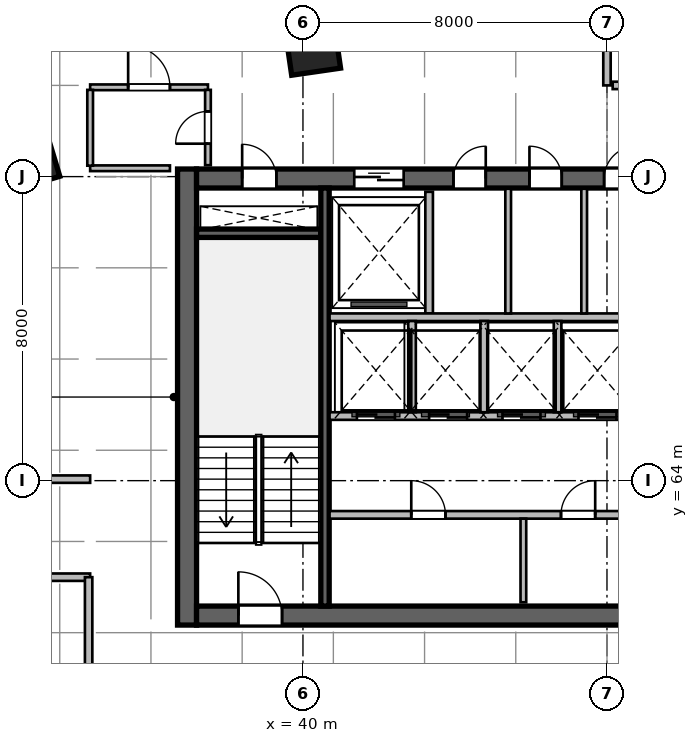
"""IFC4 building model, lengths in metres.
Left out: names, types, materials, properties, quantities, classifications, styles, units other than length and angle.
Written with IfcOpenShell. Run it as: python <this file> out.ifc"""

import sys

from ifc_helpers import new_model, si_unit, direction, frame, frame_2d, origin, origin_2d, place, context, subcontext, project, spatial, rectangle, extrude, source, transform, mapped, element, fill, save


model = new_model("IFC4")
c1 = context("Model", 3, precision=1e-05, world=origin(), true_north=direction((0.0, 1.0)))
c2 = subcontext(c1, "Body", "Model", "MODEL_VIEW")
j1 = project(units=[si_unit("LENGTHUNIT", "METRE"), si_unit("PLANEANGLEUNIT", "RADIAN")], contexts=[c1])
p1 = place(None, origin())
s1 = spatial("IfcSite", under=j1, at=p1, CompositionType="ELEMENT")
p2 = place(p1, origin())
s2 = spatial("IfcBuilding", under=s1, at=p2, CompositionType="ELEMENT")
p3 = place(p2, frame((0.0, 0.0, 111.6)))
s3 = spatial("IfcBuildingStorey", under=s2, at=p3, CompositionType="ELEMENT", Elevation=111.6)
m1 = source(origin(), c2, "Body", "SweptSolid", [
    extrude(rectangle(XDim=12.0, YDim=0.5, at=frame_2d((6.0, 0.0))), origin(), (0.0, 0.0, 1.0), 3.9),
])
p4 = place(p3, frame((36.95, 60.2, 0.0), z_axis=(0.0, 0.0, 1.0), x_axis=(0.0, 1.0, 0.0)))
e1 = element("IfcWall", 1, at=p4, inside=s3, PredefinedType="SHEAR", context=c2, shape_type="MappedRepresentation", body=[
    mapped(m1, transform((0.0, 0.0, 0.0), scale=1.0)),
])
m2 = source(origin(), c2, "Body", "SweptSolid", [
    extrude(rectangle(XDim=21.6, YDim=0.5, at=frame_2d((10.8, 0.0))), origin(), (0.0, 0.0, 1.0), 3.9),
])
p5 = place(p3, frame((37.2, 60.45, 0.0), z_axis=(0.0, 0.0, 1.0), x_axis=(1.0, 0.0, 0.0)))
e2 = element("IfcWall", 2, at=p5, inside=s3, PredefinedType="SHEAR", context=c2, shape_type="MappedRepresentation", body=[
    mapped(m2, transform((0.0, 0.0, 0.0), scale=1.0)),
])
p6 = place(p5, frame((1.1, 0.0, 0.0)))
e3 = element("IfcOpeningElement", 3, at=p6, cuts=e2, PredefinedType="OPENING", context=c2, shape_type="SweptSolid", body=[
    extrude(rectangle(XDim=1.15, YDim=2.15, at=frame_2d((0.575, 1.075))), frame((0.0, 0.26, 0.0), z_axis=(0.0, -1.0, 0.0), x_axis=(1.0, 0.0, 0.0)), (0.0, 0.0, 1.0), 0.52),
])
p7 = place(p5, frame((19.5, 0.0, 0.0)))
e4 = element("IfcOpeningElement", 4, at=p7, cuts=e2, PredefinedType="OPENING", context=c2, shape_type="SweptSolid", body=[
    extrude(rectangle(XDim=0.9, YDim=2.1, at=frame_2d((0.45, 1.05))), frame((0.0, 0.26, 0.0), z_axis=(0.0, -1.0, 0.0), x_axis=(1.0, 0.0, 0.0)), (0.0, 0.0, 1.0), 0.52),
])
p8 = place(p5, frame((12.02, 0.0, 0.0)))
e5 = element("IfcOpeningElement", 5, at=p8, cuts=e2, PredefinedType="OPENING", context=c2, shape_type="SweptSolid", body=[
    extrude(rectangle(XDim=1.6, YDim=2.15, at=frame_2d((0.8, 1.075))), frame((0.0, 0.26, 0.0), z_axis=(0.0, -1.0, 0.0), x_axis=(1.0, 0.0, 0.0)), (0.0, 0.0, 1.0), 0.52),
])
p9 = place(p3, frame((37.2, 71.95, 0.0), z_axis=(0.0, 0.0, 1.0), x_axis=(1.0, 0.0, 0.0)))
e6 = element("IfcWall", 6, at=p9, inside=s3, PredefinedType="SHEAR", context=c2, shape_type="MappedRepresentation", body=[
    mapped(m2, transform((0.0, 0.0, 0.0), scale=1.0)),
])
p10 = place(p9, frame((1.2, 0.0, 0.0)))
e7 = element("IfcOpeningElement", 7, at=p10, cuts=e6, PredefinedType="OPENING", context=c2, shape_type="SweptSolid", body=[
    extrude(rectangle(XDim=0.9, YDim=2.1, at=frame_2d((0.45, 1.05))), frame((0.0, 0.26, 0.0), z_axis=(0.0, -1.0, 0.0), x_axis=(1.0, 0.0, 0.0)), (0.0, 0.0, 1.0), 0.52),
])
p11 = place(p9, frame((14.7, 0.0, 0.0)))
e8 = element("IfcOpeningElement", 8, at=p11, cuts=e6, PredefinedType="OPENING", context=c2, shape_type="SweptSolid", body=[
    extrude(rectangle(XDim=1.2, YDim=2.15, at=frame_2d((0.6, 1.075))), frame((0.0, 0.26, 0.0), z_axis=(0.0, -1.0, 0.0), x_axis=(1.0, 0.0, 0.0)), (0.0, 0.0, 1.0), 0.52),
])
p12 = place(p9, frame((4.15, 0.0, 0.0)))
e9 = element("IfcOpeningElement", 9, at=p12, cuts=e6, PredefinedType="OPENING", context=c2, shape_type="SweptSolid", body=[
    extrude(rectangle(XDim=1.3, YDim=2.15, at=frame_2d((0.65, 1.075))), frame((0.0, 0.26, 0.0), z_axis=(0.0, -1.0, 0.0), x_axis=(1.0, 0.0, 0.0)), (0.0, 0.0, 1.0), 0.52),
])
p13 = place(p9, frame((6.76, 0.0, 0.0)))
e10 = element("IfcOpeningElement", 10, at=p13, cuts=e6, PredefinedType="OPENING", context=c2, shape_type="SweptSolid", body=[
    extrude(rectangle(XDim=0.85, YDim=2.1, at=frame_2d((0.425, 1.05))), frame((0.0, 0.26, 0.0), z_axis=(0.0, -1.0, 0.0), x_axis=(1.0, 0.0, 0.0)), (0.0, 0.0, 1.0), 0.52),
])
p14 = place(p9, frame((8.76, 0.0, 0.0)))
e11 = element("IfcOpeningElement", 11, at=p14, cuts=e6, PredefinedType="OPENING", context=c2, shape_type="SweptSolid", body=[
    extrude(rectangle(XDim=0.85, YDim=2.1, at=frame_2d((0.425, 1.05))), frame((0.0, 0.26, 0.0), z_axis=(0.0, -1.0, 0.0), x_axis=(1.0, 0.0, 0.0)), (0.0, 0.0, 1.0), 0.52),
])
p15 = place(p9, frame((10.725, 0.0, 0.0)))
e12 = element("IfcOpeningElement", 12, at=p15, cuts=e6, PredefinedType="OPENING", context=c2, shape_type="SweptSolid", body=[
    extrude(rectangle(XDim=0.85, YDim=2.1, at=frame_2d((0.425, 1.05))), frame((0.0, 0.26, 0.0), z_axis=(0.0, -1.0, 0.0), x_axis=(1.0, 0.0, 0.0)), (0.0, 0.0, 1.0), 0.52),
])
m3 = source(origin(), c2, "Body", "SweptSolid", [
    extrude(rectangle(XDim=3.27, YDim=0.22, at=frame_2d((1.635, 0.0))), origin(), (0.0, 0.0, 1.0), 3.9),
])
p16 = place(p3, frame((37.2, 70.51, 0.0), z_axis=(0.0, 0.0, 1.0), x_axis=(1.0, 0.0, 0.0)))
e13 = element("IfcWall", 13, at=p16, inside=s3, PredefinedType="SHEAR", context=c2, shape_type="MappedRepresentation", body=[
    mapped(m3, transform((0.0, 0.0, 0.0), scale=1.0)),
])
m4 = source(origin(), c2, "Body", "SweptSolid", [
    extrude(rectangle(XDim=11.0, YDim=0.22, at=frame_2d((5.5, 0.0))), origin(), (0.0, 0.0, 1.0), 3.9),
])
p17 = place(p3, frame((40.58, 60.7, 0.0), z_axis=(0.0, 0.0, 1.0), x_axis=(0.0, 1.0, 0.0)))
e14 = element("IfcWall", 14, at=p17, inside=s3, PredefinedType="SHEAR", context=c2, shape_type="MappedRepresentation", body=[
    mapped(m4, transform((0.0, 0.0, 0.0), scale=1.0)),
])
m5 = source(origin(), c2, "Body", "SweptSolid", [
    extrude(rectangle(XDim=1.3, YDim=1.3, at=origin_2d()), origin(), (0.0, 0.0, 1.0), 3.9),
])
for number, where, z_axis, x_axis in (
    (15, (32.791, 72.442, 0.0), (0.0, 0.0, 1.0), (-0.289, 0.957, 0.0)),
    (16, (40.253, 75.404, 0.0), (0.0, 0.0, 1.0), (-0.143, 0.99, 0.0)),
):
    element("IfcColumn", number, at=place(p3, frame(where, z_axis=z_axis, x_axis=x_axis)), inside=s3, PredefinedType="COLUMN", context=c2, shape_type="MappedRepresentation", body=[
        mapped(m5, transform((0.0, 0.0, 0.0), scale=1.0)),
    ])
m6 = source(origin(), c2, "Body", "SweptSolid", [
    extrude(rectangle(XDim=4.506, YDim=0.28, at=frame_2d((2.253, 0.0))), origin(), (0.0, 0.0, 1.0), 3.65),
])
p18 = place(p3, frame((31.249, 74.496, 0.0), z_axis=(0.0, 0.0, 1.0), x_axis=(0.89597155075, 0.444111450254, 0.0)))
e17 = element("IfcWall", 17, at=p18, inside=s3, PredefinedType="SOLIDWALL", context=c2, shape_type="MappedRepresentation", body=[
    mapped(m6, transform((0.0, 0.0, 0.0), scale=1.0)),
])
m7 = source(origin(), c2, "Body", "SweptSolid", [
    extrude(rectangle(XDim=3.2, YDim=0.2, at=frame_2d((1.6, 0.0))), origin(), (0.0, 0.0, 1.0), 3.65),
])
p19 = place(p3, frame((43.32, 68.4, 0.0), z_axis=(0.0, 0.0, 1.0), x_axis=(0.0, 1.0, 0.0)))
e18 = element("IfcWall", 18, at=p19, inside=s3, PredefinedType="SOLIDWALL", context=c2, shape_type="MappedRepresentation", body=[
    mapped(m7, transform((0.0, 0.0, 0.0), scale=1.0)),
])
m8 = source(origin(), c2, "Body", "SweptSolid", [
    extrude(rectangle(XDim=8.8, YDim=0.2, at=frame_2d((4.4, 0.0))), origin(), (0.0, 0.0, 1.0), 3.65),
])
p20 = place(p3, frame((40.7, 68.3, 0.0), z_axis=(0.0, 0.0, 1.0), x_axis=(1.0, 0.0, 0.0)))
e19 = element("IfcWall", 19, at=p20, inside=s3, PredefinedType="SOLIDWALL", context=c2, shape_type="MappedRepresentation", body=[
    mapped(m8, transform((0.0, 0.0, 0.0), scale=1.0)),
])
m9 = source(origin(), c2, "Body", "SweptSolid", [
    extrude(rectangle(XDim=3.28, YDim=0.15, at=frame_2d((1.64, 0.0))), origin(), (0.0, 0.0, 1.0), 3.65),
])
for number, where, z_axis, x_axis in (
    (20, (45.4, 68.4, 0.0), (0.0, 0.0, 1.0), (0.0, 1.0, 0.0)),
    (21, (47.4, 68.4, 0.0), (0.0, 0.0, 1.0), (0.0, 1.0, 0.0)),
):
    element("IfcWall", number, at=place(p3, frame(where, z_axis=z_axis, x_axis=x_axis)), inside=s3, PredefinedType="PARTITIONING", context=c2, shape_type="MappedRepresentation", body=[
        mapped(m9, transform((0.0, 0.0, 0.0), scale=1.0)),
    ])
m10 = source(origin(), c2, "Body", "SweptSolid", [
    extrude(rectangle(XDim=8.02, YDim=0.2, at=frame_2d((4.01, 0.0))), origin(), (0.0, 0.0, 1.0), 3.65),
])
p21 = place(p3, frame((40.7, 63.1, 0.0), z_axis=(0.0, 0.0, 1.0), x_axis=(1.0, 0.0, 0.0)))
e22 = element("IfcWall", 22, at=p21, inside=s3, PredefinedType="SOLIDWALL", context=c2, shape_type="MappedRepresentation", body=[
    mapped(m10, transform((0.0, 0.0, 0.0), scale=1.0)),
])
p22 = place(p21, frame((2.15, 0.0, 0.0)))
e23 = element("IfcOpeningElement", 23, at=p22, cuts=e22, PredefinedType="OPENING", context=c2, shape_type="SweptSolid", body=[
    extrude(rectangle(XDim=0.9, YDim=2.1, at=frame_2d((0.45, 1.05))), frame((0.0, 0.11, 0.0), z_axis=(0.0, -1.0, 0.0), x_axis=(1.0, 0.0, 0.0)), (0.0, 0.0, 1.0), 0.22),
])
p23 = place(p21, frame((6.09, 0.0, 0.0)))
e24 = element("IfcOpeningElement", 24, at=p23, cuts=e22, PredefinedType="OPENING", context=c2, shape_type="SweptSolid", body=[
    extrude(rectangle(XDim=0.9, YDim=2.1, at=frame_2d((0.45, 1.05))), frame((0.0, 0.11, 0.0), z_axis=(0.0, -1.0, 0.0), x_axis=(1.0, 0.0, 0.0)), (0.0, 0.0, 1.0), 0.22),
])
m11 = source(origin(), c2, "Body", "SweptSolid", [
    extrude(rectangle(XDim=2.2, YDim=0.15, at=frame_2d((1.1, 0.0))), origin(), (0.0, 0.0, 1.0), 3.65),
])
p24 = place(p3, frame((45.8, 60.8, 0.0), z_axis=(0.0, 0.0, 1.0), x_axis=(0.0, 1.0, 0.0)))
e25 = element("IfcWall", 25, at=p24, inside=s3, PredefinedType="PARTITIONING", context=c2, shape_type="MappedRepresentation", body=[
    mapped(m11, transform((0.0, 0.0, 0.0), scale=1.0)),
])
p25 = place(p3, frame((40.7, 65.7, 0.0), z_axis=(0.0, 0.0, 1.0), x_axis=(1.0, 0.0, 0.0)))
e26 = element("IfcWall", 26, at=p25, inside=s3, PredefinedType="SOLIDWALL", context=c2, shape_type="MappedRepresentation", body=[
    mapped(m8, transform((0.0, 0.0, 0.0), scale=1.0)),
])
p26 = place(p25, frame((0.72, 0.0, 0.0)))
e27 = element("IfcOpeningElement", 27, at=p26, cuts=e26, PredefinedType="OPENING", context=c2, shape_type="SweptSolid", body=[
    extrude(rectangle(XDim=1.0, YDim=2.15, at=frame_2d((0.5, 1.075))), frame((0.0, 0.11, 0.0), z_axis=(0.0, -1.0, 0.0), x_axis=(1.0, 0.0, 0.0)), (0.0, 0.0, 1.0), 0.22),
])
p27 = place(p25, frame((2.62, 0.0, 0.0)))
e28 = element("IfcOpeningElement", 28, at=p27, cuts=e26, PredefinedType="OPENING", context=c2, shape_type="SweptSolid", body=[
    extrude(rectangle(XDim=1.0, YDim=2.15, at=frame_2d((0.5, 1.075))), frame((0.0, 0.11, 0.0), z_axis=(0.0, -1.0, 0.0), x_axis=(1.0, 0.0, 0.0)), (0.0, 0.0, 1.0), 0.22),
])
p28 = place(p25, frame((4.55, 0.0, 0.0)))
e29 = element("IfcOpeningElement", 29, at=p28, cuts=e26, PredefinedType="OPENING", context=c2, shape_type="SweptSolid", body=[
    extrude(rectangle(XDim=1.0, YDim=2.15, at=frame_2d((0.5, 1.075))), frame((0.0, 0.11, 0.0), z_axis=(0.0, -1.0, 0.0), x_axis=(1.0, 0.0, 0.0)), (0.0, 0.0, 1.0), 0.22),
])
p29 = place(p25, frame((6.55, 0.0, 0.0)))
e30 = element("IfcOpeningElement", 30, at=p29, cuts=e26, PredefinedType="OPENING", context=c2, shape_type="SweptSolid", body=[
    extrude(rectangle(XDim=1.0, YDim=2.15, at=frame_2d((0.5, 1.075))), frame((0.0, 0.11, 0.0), z_axis=(0.0, -1.0, 0.0), x_axis=(1.0, 0.0, 0.0)), (0.0, 0.0, 1.0), 0.22),
])
m12 = source(origin(), c2, "Body", "SweptSolid", [
    extrude(rectangle(XDim=2.4, YDim=0.2, at=frame_2d((1.2, 0.0))), origin(), (0.0, 0.0, 1.0), 3.65),
])
for number, where, z_axis, x_axis in (
    (31, (42.87, 65.8, 0.0), (0.0, 0.0, 1.0), (0.0, 1.0, 0.0)),
    (32, (44.77, 65.8, 0.0), (0.0, 0.0, 1.0), (0.0, 1.0, 0.0)),
    (33, (46.7, 65.8, 0.0), (0.0, 0.0, 1.0), (0.0, 1.0, 0.0)),
):
    element("IfcWall", number, at=place(p3, frame(where, z_axis=z_axis, x_axis=x_axis)), inside=s3, PredefinedType="SOLIDWALL", context=c2, shape_type="MappedRepresentation", body=[
        mapped(m12, transform((0.0, 0.0, 0.0), scale=1.0)),
    ])
m13 = source(origin(), c2, "Body", "SweptSolid", [
    extrude(rectangle(XDim=2.1, YDim=0.15, at=frame_2d((1.05, 0.0))), origin(), (0.0, 0.0, 1.0), 3.65),
])
p30 = place(p3, frame((34.4, 72.22, 0.0), z_axis=(0.0, 0.0, 1.0), x_axis=(1.0, 0.0, 0.0)))
e34 = element("IfcWall", 34, at=p30, inside=s3, PredefinedType="PARTITIONING", context=c2, shape_type="MappedRepresentation", body=[
    mapped(m13, transform((0.0, 0.0, 0.0), scale=1.0)),
])
m14 = source(origin(), c2, "Body", "SweptSolid", [
    extrude(rectangle(XDim=3.1, YDim=0.15, at=frame_2d((1.55, 0.0))), origin(), (0.0, 0.0, 1.0), 3.022),
])
p31 = place(p3, frame((34.4, 74.35, 0.0), z_axis=(0.0, 0.0, 1.0), x_axis=(1.0, 0.0, 0.0)))
e35 = element("IfcWall", 35, at=p31, inside=s3, PredefinedType="PARTITIONING", context=c2, shape_type="MappedRepresentation", body=[
    mapped(m14, transform((0.0, 0.0, 0.0), scale=1.0)),
])
p32 = place(p31, frame((1.0, 0.0, 0.0)))
e36 = element("IfcOpeningElement", 36, at=p32, cuts=e35, PredefinedType="OPENING", context=c2, shape_type="SweptSolid", body=[
    extrude(rectangle(XDim=1.1, YDim=2.15, at=frame_2d((0.55, 1.075))), frame((0.0, 0.085, 0.0), z_axis=(0.0, -1.0, 0.0), x_axis=(1.0, 0.0, 0.0)), (0.0, 0.0, 1.0), 0.17),
])
m15 = source(origin(), c2, "Body", "SweptSolid", [
    extrude(rectangle(XDim=1.995, YDim=0.15, at=frame_2d((0.998, 0.0))), origin(), (0.0, 0.0, 1.0), 3.65),
])
p33 = place(p3, frame((34.4, 72.288, 0.0), z_axis=(0.0, 0.0, 1.0), x_axis=(0.0, 1.0, 0.0)))
e37 = element("IfcWall", 37, at=p33, inside=s3, PredefinedType="PARTITIONING", context=c2, shape_type="MappedRepresentation", body=[
    mapped(m15, transform((0.0, 0.0, 0.0), scale=1.0)),
])
m16 = source(origin(), c2, "Body", "SweptSolid", [
    extrude(rectangle(XDim=1.982, YDim=0.15, at=frame_2d((0.991, 0.0))), origin(), (0.0, 0.0, 1.0), 3.65),
])
p34 = place(p3, frame((37.5, 72.3, 0.0), z_axis=(0.0, 0.0, 1.0), x_axis=(0.0, 1.0, 0.0)))
e38 = element("IfcWall", 38, at=p34, inside=s3, PredefinedType="PARTITIONING", context=c2, shape_type="MappedRepresentation", body=[
    mapped(m16, transform((0.0, 0.0, 0.0), scale=1.0)),
])
p35 = place(p34, frame((0.566, 0.0, 0.0)))
e39 = element("IfcOpeningElement", 39, at=p35, cuts=e38, PredefinedType="OPENING", context=c2, shape_type="SweptSolid", body=[
    extrude(rectangle(XDim=0.85, YDim=2.1, at=frame_2d((0.425, 1.05))), frame((0.0, 0.085, 0.0), z_axis=(0.0, -1.0, 0.0), x_axis=(1.0, 0.0, 0.0)), (0.0, 0.0, 1.0), 0.17),
])
m17 = source(origin(), c2, "Body", "SweptSolid", [
    extrude(rectangle(XDim=4.695, YDim=0.195, at=frame_2d((2.347, 0.0))), origin(), (0.0, 0.0, 1.0), 2.942),
])
p36 = place(p3, frame((48.0, 74.4, 0.0), z_axis=(0.0, 0.0, 1.0), x_axis=(0.0, 1.0, 0.0)))
e40 = element("IfcWall", 40, at=p36, inside=s3, PredefinedType="PARTITIONING", context=c2, shape_type="MappedRepresentation", body=[
    mapped(m17, transform((0.0, 0.0, 0.0), scale=1.0)),
])
m18 = source(origin(), c2, "Body", "SweptSolid", [
    extrude(rectangle(XDim=13.2, YDim=0.195, at=frame_2d((6.6, 0.0))), origin(), (0.0, 0.0, 1.0), 3.022),
])
p37 = place(p3, frame((48.15, 74.4, 0.0), z_axis=(0.0, 0.0, 1.0), x_axis=(1.0, 0.0, 0.0)))
e41 = element("IfcWall", 41, at=p37, inside=s3, PredefinedType="PARTITIONING", context=c2, shape_type="MappedRepresentation", body=[
    mapped(m18, transform((0.0, 0.0, 0.0), scale=1.0)),
])
p38 = place(p37, frame((5.6, 0.0, 0.0)))
e42 = element("IfcOpeningElement", 42, at=p38, cuts=e41, PredefinedType="OPENING", context=c2, shape_type="SweptSolid", body=[
    extrude(rectangle(XDim=1.1, YDim=2.15, at=frame_2d((0.55, 1.075))), frame((0.0, 0.107, 0.0), z_axis=(0.0, -1.0, 0.0), x_axis=(1.0, 0.0, 0.0)), (0.0, 0.0, 1.0), 0.215),
])
m19 = source(origin(), c2, "Body", "SweptSolid", [
    extrude(rectangle(XDim=7.4, YDim=0.195, at=frame_2d((3.7, 0.0))), origin(), (0.0, 0.0, 1.0), 3.65),
])
p39 = place(p3, frame((27.0, 64.04, 0.0), z_axis=(0.0, 0.0, 1.0), x_axis=(1.0, 0.0, 0.0)))
e43 = element("IfcWall", 43, at=p39, inside=s3, PredefinedType="PARTITIONING", context=c2, shape_type="MappedRepresentation", body=[
    mapped(m19, transform((0.0, 0.0, 0.0), scale=1.0)),
])
p40 = place(p39, frame((3.225, 0.0, 0.0)))
e44 = element("IfcOpeningElement", 44, at=p40, cuts=e43, PredefinedType="OPENING", context=c2, shape_type="SweptSolid", body=[
    extrude(rectangle(XDim=0.95, YDim=2.1, at=frame_2d((0.475, 1.05))), frame((0.0, 0.107, 0.0), z_axis=(0.0, -1.0, 0.0), x_axis=(1.0, 0.0, 0.0)), (0.0, 0.0, 1.0), 0.215),
])
p41 = place(p3, frame((27.0, 61.46, 0.0), z_axis=(0.0, 0.0, 1.0), x_axis=(1.0, 0.0, 0.0)))
e45 = element("IfcWall", 45, at=p41, inside=s3, PredefinedType="PARTITIONING", context=c2, shape_type="MappedRepresentation", body=[
    mapped(m19, transform((0.0, 0.0, 0.0), scale=1.0)),
])
p42 = place(p41, frame((3.225, 0.0, 0.0)))
e46 = element("IfcOpeningElement", 46, at=p42, cuts=e45, PredefinedType="OPENING", context=c2, shape_type="SweptSolid", body=[
    extrude(rectangle(XDim=0.95, YDim=2.1, at=frame_2d((0.475, 1.05))), frame((0.0, 0.107, 0.0), z_axis=(0.0, -1.0, 0.0), x_axis=(1.0, 0.0, 0.0)), (0.0, 0.0, 1.0), 0.215),
])
m20 = source(origin(), c2, "Body", "SweptSolid", [
    extrude(rectangle(XDim=13.988, YDim=0.195, at=frame_2d((6.994, 0.0))), origin(), (0.0, 0.0, 1.0), 3.65),
])
p43 = place(p3, frame((34.36, 47.472, 0.0), z_axis=(0.0, 0.0, 1.0), x_axis=(0.0, 1.0, 0.0)))
e47 = element("IfcWall", 47, at=p43, inside=s3, PredefinedType="PARTITIONING", context=c2, shape_type="MappedRepresentation", body=[
    mapped(m20, transform((0.0, 0.0, 0.0), scale=1.0)),
])
m21 = source(origin(), c2, "Body", "SweptSolid", [
    extrude(rectangle(XDim=1.15, YDim=2.15, at=frame_2d((0.575, 1.075))), frame((0.0, 0.025, 0.0), z_axis=(0.0, -1.0, 0.0), x_axis=(1.0, 0.0, 0.0)), (0.0, 0.0, 1.0), 0.05),
])
p44 = place(p6, origin())
e48 = element("IfcDoor", 48, at=p44, inside=s3, OperationType="SINGLE_SWING_LEFT", PredefinedType="DOOR", context=c2, shape_type="MappedRepresentation", body=[
    mapped(m21, transform((0.0, 0.0, 0.0), scale=1.0)),
])
fill(e3, e48)
m22 = source(origin(), c2, "Body", "SweptSolid", [
    extrude(rectangle(XDim=0.9, YDim=2.1, at=frame_2d((0.45, 1.05))), frame((0.0, 0.025, 0.0), z_axis=(0.0, -1.0, 0.0), x_axis=(1.0, 0.0, 0.0)), (0.0, 0.0, 1.0), 0.05),
])
p45 = place(p10, origin())
e49 = element("IfcDoor", 49, at=p45, inside=s3, OperationType="SINGLE_SWING_LEFT", PredefinedType="DOOR", context=c2, shape_type="MappedRepresentation", body=[
    mapped(m22, transform((0.0, 0.0, 0.0), scale=1.0)),
])
fill(e7, e49)
m23 = source(origin(), c2, "Body", "SweptSolid", [
    extrude(rectangle(XDim=1.3, YDim=2.15, at=frame_2d((0.65, 1.075))), frame((0.0, 0.025, 0.0), z_axis=(0.0, -1.0, 0.0), x_axis=(1.0, 0.0, 0.0)), (0.0, 0.0, 1.0), 0.05),
])
p46 = place(p12, origin())
e50 = element("IfcDoor", 50, at=p46, inside=s3, OperationType="DOUBLE_DOOR_SLIDING", PredefinedType="DOOR", context=c2, shape_type="MappedRepresentation", body=[
    mapped(m23, transform((0.0, 0.0, 0.0), scale=1.0)),
])
fill(e9, e50)
m24 = source(origin(), c2, "Body", "SweptSolid", [
    extrude(rectangle(XDim=0.85, YDim=2.1, at=frame_2d((0.425, 1.05))), frame((0.0, 0.025, 0.0), z_axis=(0.0, -1.0, 0.0), x_axis=(1.0, 0.0, 0.0)), (0.0, 0.0, 1.0), 0.05),
])
p47 = place(p13, origin())
e51 = element("IfcDoor", 51, at=p47, inside=s3, OperationType="SINGLE_SWING_RIGHT", PredefinedType="DOOR", context=c2, shape_type="MappedRepresentation", body=[
    mapped(m24, transform((0.0, 0.0, 0.0), scale=1.0)),
])
fill(e10, e51)
p48 = place(p14, origin())
e52 = element("IfcDoor", 52, at=p48, inside=s3, OperationType="SINGLE_SWING_LEFT", PredefinedType="DOOR", context=c2, shape_type="MappedRepresentation", body=[
    mapped(m24, transform((0.0, 0.0, 0.0), scale=1.0)),
])
fill(e11, e52)
p49 = place(p15, origin())
e53 = element("IfcDoor", 53, at=p49, inside=s3, OperationType="SINGLE_SWING_RIGHT", PredefinedType="DOOR", context=c2, shape_type="MappedRepresentation", body=[
    mapped(m24, transform((0.0, 0.0, 0.0), scale=1.0)),
])
fill(e12, e53)
p50 = place(p22, origin())
e54 = element("IfcDoor", 54, at=p50, inside=s3, OperationType="SINGLE_SWING_LEFT", PredefinedType="DOOR", context=c2, shape_type="MappedRepresentation", body=[
    mapped(m22, transform((0.0, 0.0, 0.0), scale=1.0)),
])
fill(e23, e54)
p51 = place(p23, origin())
e55 = element("IfcDoor", 55, at=p51, inside=s3, OperationType="SINGLE_SWING_RIGHT", PredefinedType="DOOR", context=c2, shape_type="MappedRepresentation", body=[
    mapped(m22, transform((0.0, 0.0, 0.0), scale=1.0)),
])
fill(e24, e55)
m25 = source(origin(), c2, "Body", "SweptSolid", [
    extrude(rectangle(XDim=1.0, YDim=2.15, at=frame_2d((0.5, 1.075))), frame((0.0, 0.025, 0.0), z_axis=(0.0, -1.0, 0.0), x_axis=(1.0, 0.0, 0.0)), (0.0, 0.0, 1.0), 0.05),
])
p52 = place(p26, origin())
e56 = element("IfcDoor", 56, at=p52, inside=s3, OperationType="DOUBLE_DOOR_SLIDING", PredefinedType="DOOR", context=c2, shape_type="MappedRepresentation", body=[
    mapped(m25, transform((0.0, 0.0, 0.0), scale=1.0)),
])
fill(e27, e56)
p53 = place(p27, origin())
e57 = element("IfcDoor", 57, at=p53, inside=s3, OperationType="DOUBLE_DOOR_SLIDING", PredefinedType="DOOR", context=c2, shape_type="MappedRepresentation", body=[
    mapped(m25, transform((0.0, 0.0, 0.0), scale=1.0)),
])
fill(e28, e57)
p54 = place(p28, origin())
e58 = element("IfcDoor", 58, at=p54, inside=s3, OperationType="DOUBLE_DOOR_SLIDING", PredefinedType="DOOR", context=c2, shape_type="MappedRepresentation", body=[
    mapped(m25, transform((0.0, 0.0, 0.0), scale=1.0)),
])
fill(e29, e58)
p55 = place(p29, origin())
e59 = element("IfcDoor", 59, at=p55, inside=s3, OperationType="DOUBLE_DOOR_SLIDING", PredefinedType="DOOR", context=c2, shape_type="MappedRepresentation", body=[
    mapped(m25, transform((0.0, 0.0, 0.0), scale=1.0)),
])
fill(e30, e59)
p56 = place(p35, origin())
e60 = element("IfcDoor", 60, at=p56, inside=s3, OperationType="SINGLE_SWING_LEFT", PredefinedType="DOOR", context=c2, shape_type="MappedRepresentation", body=[
    mapped(m24, transform((0.0, 0.0, 0.0), scale=1.0)),
])
fill(e39, e60)
m26 = source(origin(), c2, "Body", "SweptSolid", [
    extrude(rectangle(XDim=1.1, YDim=2.15, at=frame_2d((0.55, 1.075))), frame((0.0, 0.025, 0.0), z_axis=(0.0, -1.0, 0.0), x_axis=(1.0, 0.0, 0.0)), (0.0, 0.0, 1.0), 0.05),
])
p57 = place(p32, origin())
e61 = element("IfcDoor", 61, at=p57, inside=s3, OperationType="SINGLE_SWING_LEFT", PredefinedType="DOOR", context=c2, shape_type="MappedRepresentation", body=[
    mapped(m26, transform((0.0, 0.0, 0.0), scale=1.0)),
])
fill(e36, e61)
save(model, sys.argv[1])
